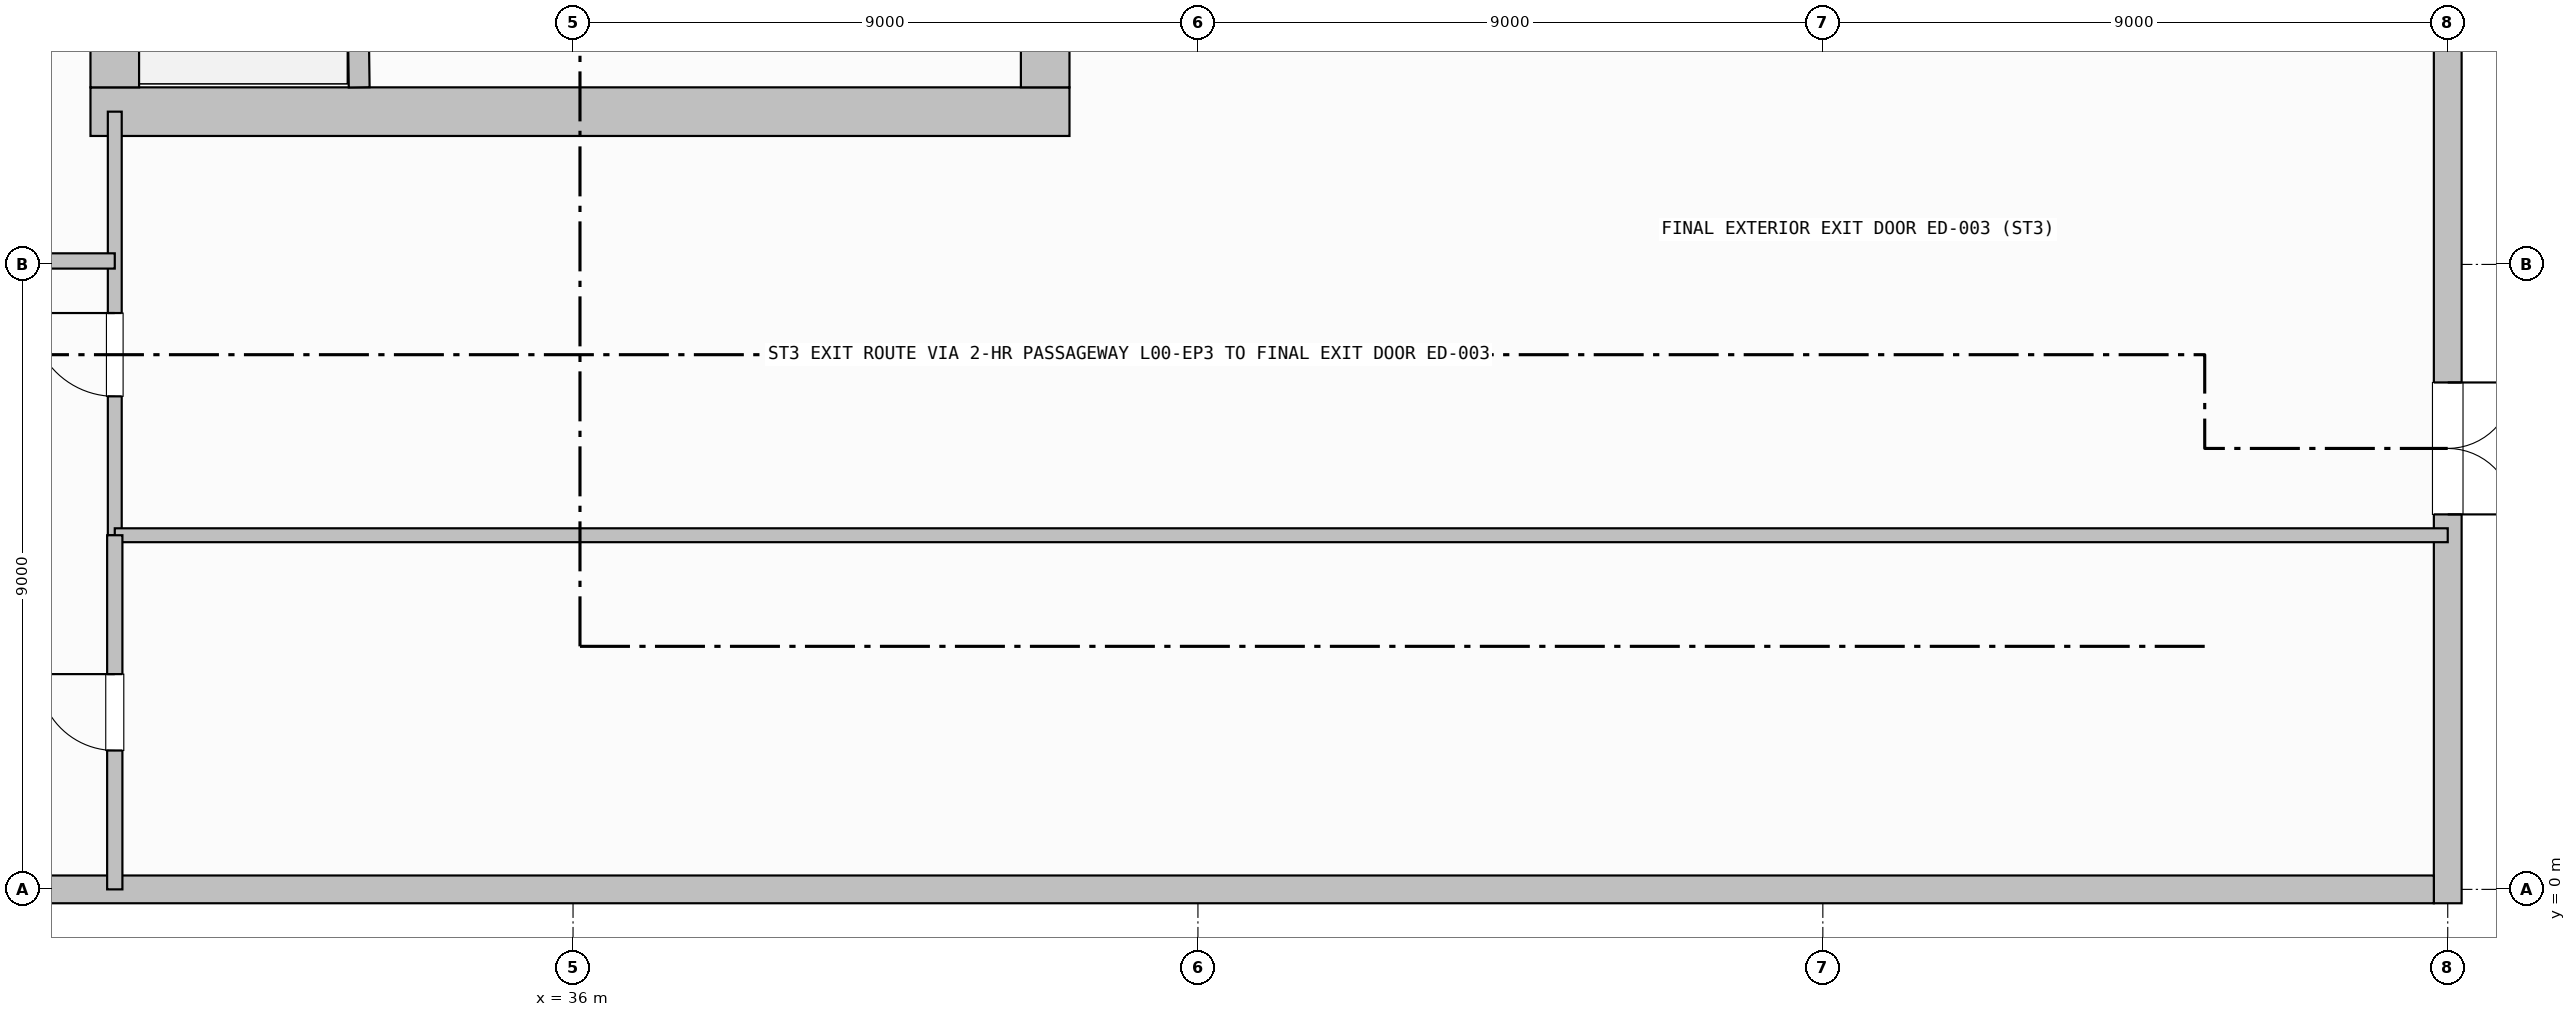
"""IFC4 building model, lengths in metres.
Left out: names, types, materials, properties, quantities, classifications, styles, units other than length and angle.
Written with IfcOpenShell. Run it as: python <this file> out.ifc"""

import sys

from ifc_helpers import new_model, si_unit, direction, frame, frame_2d, origin, origin_2d, place, context, subcontext, project, spatial, rectangle, i_section, extrude, element, fill, save


model = new_model("IFC4")
c1 = context("Model", 3, precision=1e-05, world=origin(), true_north=direction((0.0, 1.0)))
c2 = subcontext(c1, "Body", "Model", "MODEL_VIEW")
j1 = project(units=[si_unit("LENGTHUNIT", "METRE"), si_unit("PLANEANGLEUNIT", "RADIAN")], contexts=[c1])
p1 = place(None, origin())
s1 = spatial("IfcSite", under=j1, at=p1, CompositionType="ELEMENT")
p2 = place(p1, origin())
s2 = spatial("IfcBuilding", under=s1, at=p2, CompositionType="ELEMENT")
p3 = place(p2, origin())
s3 = spatial("IfcBuildingStorey", under=s2, at=p3, CompositionType="ELEMENT", Elevation=0.0)
for number, where, z_axis, x_axis in (
    (1, (36.0, 0.0, 0.0), (0.0, 0.0, 1.0), (1.0, 0.0, 0.0)),
    (2, (36.0, 9.0, 0.0), (0.0, 0.0, 1.0), (1.0, 0.0, 0.0)),
    (3, (45.0, 0.0, 0.0), (0.0, 0.0, 1.0), (1.0, 0.0, 0.0)),
    (4, (45.0, 9.0, 0.0), (0.0, 0.0, 1.0), (1.0, 0.0, 0.0)),
    (5, (54.0, 0.0, 0.0), (0.0, 0.0, 1.0), (1.0, 0.0, 0.0)),
    (6, (54.0, 9.0, 0.0), (0.0, 0.0, 1.0), (1.0, 0.0, 0.0)),
    (7, (63.0, 0.0, 0.0), (0.0, 0.0, 1.0), (1.0, 0.0, 0.0)),
    (8, (63.0, 9.0, 0.0), (0.0, 0.0, 1.0), (1.0, 0.0, 0.0)),
    (9, (36.0, 4.5, 0.0), (0.0, 0.0, 1.0), (1.0, 0.0, 0.0)),
    (10, (45.0, 4.5, 0.0), (0.0, 0.0, 1.0), (1.0, 0.0, 0.0)),
    (11, (54.0, 4.5, 0.0), (0.0, 0.0, 1.0), (1.0, 0.0, 0.0)),
    (12, (63.0, 4.5, 0.0), (0.0, 0.0, 1.0), (1.0, 0.0, 0.0)),
):
    element("IfcColumn", number, at=place(p3, frame(where, z_axis=z_axis, x_axis=x_axis)), inside=s3, PredefinedType="COLUMN", context=c2, shape_type="SweptSolid", body=[
        extrude(i_section(OverallWidth=0.454, OverallDepth=0.569, WebThickness=0.078, FlangeThickness=0.125, FilletRadius=0.015, at=origin_2d()), origin(), (0.0, 0.0, 1.0), 5.8),
    ])
p4 = place(p3, frame((63.0, 54.2, 0.0), z_axis=(0.0, 0.0, 1.0), x_axis=(0.0, -1.0, 0.0)))
e13 = element("IfcWall", 13, at=p4, inside=s3, PredefinedType="SOLIDWALL", context=c2, shape_type="SweptSolid", body=[
    extrude(rectangle(XDim=54.4, YDim=0.4, at=frame_2d((27.2, 0.0))), origin(), (0.0, 0.0, 1.0), 5.48),
])
p5 = place(p4, frame((46.9, 0.0, 0.0)))
e14 = element("IfcOpeningElement", 14, at=p5, cuts=e13, PredefinedType="OPENING", context=c2, shape_type="SweptSolid", body=[
    extrude(rectangle(XDim=1.9, YDim=2.2, at=frame_2d((0.95, 1.1))), frame((0.0, 0.21, 0.0), z_axis=(0.0, -1.0, 0.0), x_axis=(1.0, 0.0, 0.0)), (0.0, 0.0, 1.0), 0.42),
])
p6 = place(p4, frame((12.4, 0.0, 0.0)))
e15 = element("IfcOpeningElement", 15, at=p6, cuts=e13, PredefinedType="OPENING", context=c2, shape_type="SweptSolid", body=[
    extrude(rectangle(XDim=1.6, YDim=2.2, at=frame_2d((0.8, 1.1))), frame((0.0, 0.21, 0.0), z_axis=(0.0, -1.0, 0.0), x_axis=(1.0, 0.0, 0.0)), (0.0, 0.0, 1.0), 0.42),
])
p7 = place(p4, frame((21.4, 0.0, 0.0)))
e16 = element("IfcOpeningElement", 16, at=p7, cuts=e13, PredefinedType="OPENING", context=c2, shape_type="SweptSolid", body=[
    extrude(rectangle(XDim=1.6, YDim=2.2, at=frame_2d((0.8, 1.1))), frame((0.0, 0.21, 0.0), z_axis=(0.0, -1.0, 0.0), x_axis=(1.0, 0.0, 0.0)), (0.0, 0.0, 1.0), 0.42),
])
p8 = place(p4, frame((29.6, 0.0, 0.0)))
e17 = element("IfcOpeningElement", 17, at=p8, cuts=e13, PredefinedType="OPENING", context=c2, shape_type="SweptSolid", body=[
    extrude(rectangle(XDim=4.2, YDim=3.8, at=frame_2d((2.1, 1.9))), frame((0.0, 0.21, 0.0), z_axis=(0.0, -1.0, 0.0), x_axis=(1.0, 0.0, 0.0)), (0.0, 0.0, 1.0), 0.42),
])
p9 = place(p3, frame((62.8, 0.0, 0.0), z_axis=(0.0, 0.0, 1.0), x_axis=(-1.0, 0.0, 0.0)))
e18 = element("IfcWall", 18, at=p9, inside=s3, PredefinedType="SOLIDWALL", context=c2, shape_type="SweptSolid", body=[
    extrude(rectangle(XDim=62.6, YDim=0.4, at=frame_2d((31.3, 0.0))), origin(), (0.0, 0.0, 1.0), 5.48),
])
p10 = place(p9, frame((57.7, 0.0, 1.1)))
e19 = element("IfcOpeningElement", 19, at=p10, cuts=e18, PredefinedType="OPENING", context=c2, shape_type="SweptSolid", body=[
    extrude(rectangle(XDim=1.2, YDim=1.5, at=frame_2d((0.6, 0.75))), frame((0.0, 0.21, 0.0), z_axis=(0.0, -1.0, 0.0), x_axis=(1.0, 0.0, 0.0)), (0.0, 0.0, 1.0), 0.42),
])
p11 = place(p9, frame((48.1, 0.0, 1.1)))
e20 = element("IfcOpeningElement", 20, at=p11, cuts=e18, PredefinedType="OPENING", context=c2, shape_type="SweptSolid", body=[
    extrude(rectangle(XDim=2.4, YDim=1.95, at=frame_2d((1.2, 0.975))), frame((0.0, 0.21, 0.0), z_axis=(0.0, -1.0, 0.0), x_axis=(1.0, 0.0, 0.0)), (0.0, 0.0, 1.0), 0.42),
])
p12 = place(p9, frame((38.95, 0.0, 1.1)))
e21 = element("IfcOpeningElement", 21, at=p12, cuts=e18, PredefinedType="OPENING", context=c2, shape_type="SweptSolid", body=[
    extrude(rectangle(XDim=2.7, YDim=2.1, at=frame_2d((1.35, 1.05))), frame((0.0, 0.21, 0.0), z_axis=(0.0, -1.0, 0.0), x_axis=(1.0, 0.0, 0.0)), (0.0, 0.0, 1.0), 0.42),
])
p13 = place(p9, frame((29.8, 0.0, 1.1)))
e22 = element("IfcOpeningElement", 22, at=p13, cuts=e18, PredefinedType="OPENING", context=c2, shape_type="SweptSolid", body=[
    extrude(rectangle(XDim=3.0, YDim=2.25, at=frame_2d((1.5, 1.125))), frame((0.0, 0.21, 0.0), z_axis=(0.0, -1.0, 0.0), x_axis=(1.0, 0.0, 0.0)), (0.0, 0.0, 1.0), 0.42),
])
p14 = place(p9, frame((12.175, 0.0, 1.1)))
e23 = element("IfcOpeningElement", 23, at=p14, cuts=e18, PredefinedType="OPENING", context=c2, shape_type="SweptSolid", body=[
    extrude(rectangle(XDim=2.25, YDim=2.1, at=frame_2d((1.125, 1.05))), frame((0.0, 0.21, 0.0), z_axis=(0.0, -1.0, 0.0), x_axis=(1.0, 0.0, 0.0)), (0.0, 0.0, 1.0), 0.42),
])
p15 = place(p9, frame((3.025, 0.0, 1.1)))
e24 = element("IfcOpeningElement", 24, at=p15, cuts=e18, PredefinedType="OPENING", context=c2, shape_type="SweptSolid", body=[
    extrude(rectangle(XDim=2.55, YDim=2.25, at=frame_2d((1.275, 1.125))), frame((0.0, 0.21, 0.0), z_axis=(0.0, -1.0, 0.0), x_axis=(1.0, 0.0, 0.0)), (0.0, 0.0, 1.0), 0.42),
])
p16 = place(p3, frame((43.15, 11.2, 0.0), z_axis=(0.0, 0.0, 1.0), x_axis=(-1.0, 0.0, 0.0)))
e25 = element("IfcWall", 25, at=p16, inside=s3, PredefinedType="SHEAR", context=c2, shape_type="SweptSolid", body=[
    extrude(rectangle(XDim=14.1, YDim=0.7, at=frame_2d((7.05, 0.0))), origin(), (0.0, 0.0, 1.0), 5.48),
])
p17 = place(p3, frame((29.4, 24.25, 0.0), z_axis=(0.0, 0.0, 1.0), x_axis=(0.0, -1.0, 0.0)))
e26 = element("IfcWall", 26, at=p17, inside=s3, PredefinedType="SHEAR", context=c2, shape_type="SweptSolid", body=[
    extrude(rectangle(XDim=12.7, YDim=0.7, at=frame_2d((6.35, 0.0))), origin(), (0.0, 0.0, 1.0), 5.48),
])
p18 = place(p17, frame((1.35, 0.0, 0.0)))
e27 = element("IfcOpeningElement", 27, at=p18, cuts=e26, PredefinedType="OPENING", context=c2, shape_type="SweptSolid", body=[
    extrude(rectangle(XDim=1.35, YDim=2.15, at=frame_2d((0.675, 1.075))), frame((0.0, 0.36, 0.0), z_axis=(0.0, -1.0, 0.0), x_axis=(1.0, 0.0, 0.0)), (0.0, 0.0, 1.0), 0.72),
])
p19 = place(p3, frame((42.8, 11.55, 0.0), z_axis=(0.0, 0.0, 1.0), x_axis=(0.0, 1.0, 0.0)))
e28 = element("IfcWall", 28, at=p19, inside=s3, PredefinedType="SHEAR", context=c2, shape_type="SweptSolid", body=[
    extrude(rectangle(XDim=12.7, YDim=0.7, at=frame_2d((6.35, 0.0))), origin(), (0.0, 0.0, 1.0), 5.48),
])
p20 = place(p3, frame((32.92, 11.55, 0.0), z_axis=(0.0, 0.0, 1.0), x_axis=(-0.01331804616, 0.99991131089, 0.0)))
e29 = element("IfcWall", 29, at=p20, inside=s3, PredefinedType="SHEAR", context=c2, shape_type="SweptSolid", body=[
    extrude(rectangle(XDim=9.001, YDim=0.3, at=frame_2d((4.5, 0.0))), origin(), (0.0, 0.0, 1.0), 5.48),
])
p21 = place(p3, frame((29.4, 5.1, 0.0), z_axis=(0.0, 0.0, 1.0), x_axis=(0.0, 1.0, 0.0)))
e30 = element("IfcWall", 30, at=p21, inside=s3, PredefinedType="PARTITIONING", context=c2, shape_type="SweptSolid", body=[
    extrude(rectangle(XDim=6.1, YDim=0.2, at=frame_2d((3.05, 0.0))), origin(), (0.0, 0.0, 1.0), 4.533),
])
p22 = place(p21, frame((2.0, 0.0, 0.0)))
e31 = element("IfcOpeningElement", 31, at=p22, cuts=e30, PredefinedType="OPENING", context=c2, shape_type="SweptSolid", body=[
    extrude(rectangle(XDim=1.2, YDim=2.15, at=frame_2d((0.6, 1.075))), frame((0.0, 0.11, 0.0), z_axis=(0.0, -1.0, 0.0), x_axis=(1.0, 0.0, 0.0)), (0.0, 0.0, 1.0), 0.22),
])
p23 = place(p3, frame((29.4, 5.1, 0.0), z_axis=(0.0, 0.0, 1.0), x_axis=(1.0, 0.0, 0.0)))
e32 = element("IfcWall", 32, at=p23, inside=s3, PredefinedType="PARTITIONING", context=c2, shape_type="SweptSolid", body=[
    extrude(rectangle(XDim=33.6, YDim=0.2, at=frame_2d((16.8, 0.0))), origin(), (0.0, 0.0, 1.0), 4.605),
])
p24 = place(p3, frame((10.75, 9.05, 0.0), z_axis=(0.0, 0.0, 1.0), x_axis=(1.0, 0.0, 0.0)))
e33 = element("IfcWall", 33, at=p24, inside=s3, PredefinedType="PARTITIONING", context=c2, shape_type="SweptSolid", body=[
    extrude(rectangle(XDim=18.65, YDim=0.22, at=frame_2d((9.325, 0.0))), origin(), (0.0, 0.0, 1.0), 4.533),
])
p25 = place(p24, frame((14.4, 0.0, 0.0)))
e34 = element("IfcOpeningElement", 34, at=p25, cuts=e33, PredefinedType="OPENING", context=c2, shape_type="SweptSolid", body=[
    extrude(rectangle(XDim=1.1, YDim=2.15, at=frame_2d((0.55, 1.075))), frame((0.0, 0.12, 0.0), z_axis=(0.0, -1.0, 0.0), x_axis=(1.0, 0.0, 0.0)), (0.0, 0.0, 1.0), 0.24),
])
p26 = place(p3, frame((29.4, 0.0, 0.0), z_axis=(0.0, 0.0, 1.0), x_axis=(0.0, 1.0, 0.0)))
e35 = element("IfcWall", 35, at=p26, inside=s3, PredefinedType="PARTITIONING", context=c2, shape_type="SweptSolid", body=[
    extrude(rectangle(XDim=5.1, YDim=0.22, at=frame_2d((2.55, 0.0))), origin(), (0.0, 0.0, 1.0), 4.533),
])
p27 = place(p26, frame((2.0, 0.0, 0.0)))
e36 = element("IfcOpeningElement", 36, at=p27, cuts=e35, PredefinedType="OPENING", context=c2, shape_type="SweptSolid", body=[
    extrude(rectangle(XDim=1.1, YDim=2.15, at=frame_2d((0.55, 1.075))), frame((0.0, 0.12, 0.0), z_axis=(0.0, -1.0, 0.0), x_axis=(1.0, 0.0, 0.0)), (0.0, 0.0, 1.0), 0.24),
])
p28 = place(p5, origin())
e37 = element("IfcDoor", 37, at=p28, inside=s3, OperationType="DOUBLE_DOOR_SINGLE_SWING", PredefinedType="DOOR", context=c2, shape_type="SweptSolid", body=[
    extrude(rectangle(XDim=1.9, YDim=2.2, at=frame_2d((0.95, 1.1))), frame((0.0, 0.025, 0.0), z_axis=(0.0, -1.0, 0.0), x_axis=(1.0, 0.0, 0.0)), (0.0, 0.0, 1.0), 0.05),
])
fill(e14, e37)
p29 = place(p13, origin())
e38 = element("IfcWindow", 38, at=p29, inside=s3, PartitioningType="SINGLE_PANEL", PredefinedType="WINDOW", context=c2, shape_type="SweptSolid", body=[
    extrude(rectangle(XDim=3.0, YDim=2.25, at=frame_2d((1.5, 1.125))), frame((0.0, 0.03, 0.0), z_axis=(0.0, -1.0, 0.0), x_axis=(1.0, 0.0, 0.0)), (0.0, 0.0, 1.0), 0.06),
])
fill(e22, e38)
p30 = place(p14, origin())
e39 = element("IfcWindow", 39, at=p30, inside=s3, PartitioningType="SINGLE_PANEL", PredefinedType="WINDOW", context=c2, shape_type="SweptSolid", body=[
    extrude(rectangle(XDim=2.25, YDim=2.1, at=frame_2d((1.125, 1.05))), frame((0.0, 0.03, 0.0), z_axis=(0.0, -1.0, 0.0), x_axis=(1.0, 0.0, 0.0)), (0.0, 0.0, 1.0), 0.06),
])
fill(e23, e39)
p31 = place(p15, origin())
e40 = element("IfcWindow", 40, at=p31, inside=s3, PartitioningType="SINGLE_PANEL", PredefinedType="WINDOW", context=c2, shape_type="SweptSolid", body=[
    extrude(rectangle(XDim=2.55, YDim=2.25, at=frame_2d((1.275, 1.125))), frame((0.0, 0.03, 0.0), z_axis=(0.0, -1.0, 0.0), x_axis=(1.0, 0.0, 0.0)), (0.0, 0.0, 1.0), 0.06),
])
fill(e24, e40)
p32 = place(p22, origin())
e41 = element("IfcDoor", 41, at=p32, inside=s3, OperationType="SINGLE_SWING_RIGHT", PredefinedType="DOOR", context=c2, shape_type="SweptSolid", body=[
    extrude(rectangle(XDim=1.2, YDim=2.15, at=frame_2d((0.6, 1.075))), frame((0.0, 0.025, 0.0), z_axis=(0.0, -1.0, 0.0), x_axis=(1.0, 0.0, 0.0)), (0.0, 0.0, 1.0), 0.05),
])
fill(e31, e41)
p33 = place(p27, origin())
e42 = element("IfcDoor", 42, at=p33, inside=s3, OperationType="SINGLE_SWING_RIGHT", PredefinedType="DOOR", context=c2, shape_type="SweptSolid", body=[
    extrude(rectangle(XDim=1.1, YDim=2.15, at=frame_2d((0.55, 1.075))), frame((0.0, 0.025, 0.0), z_axis=(0.0, -1.0, 0.0), x_axis=(1.0, 0.0, 0.0)), (0.0, 0.0, 1.0), 0.05),
])
fill(e36, e42)
save(model, sys.argv[1])
